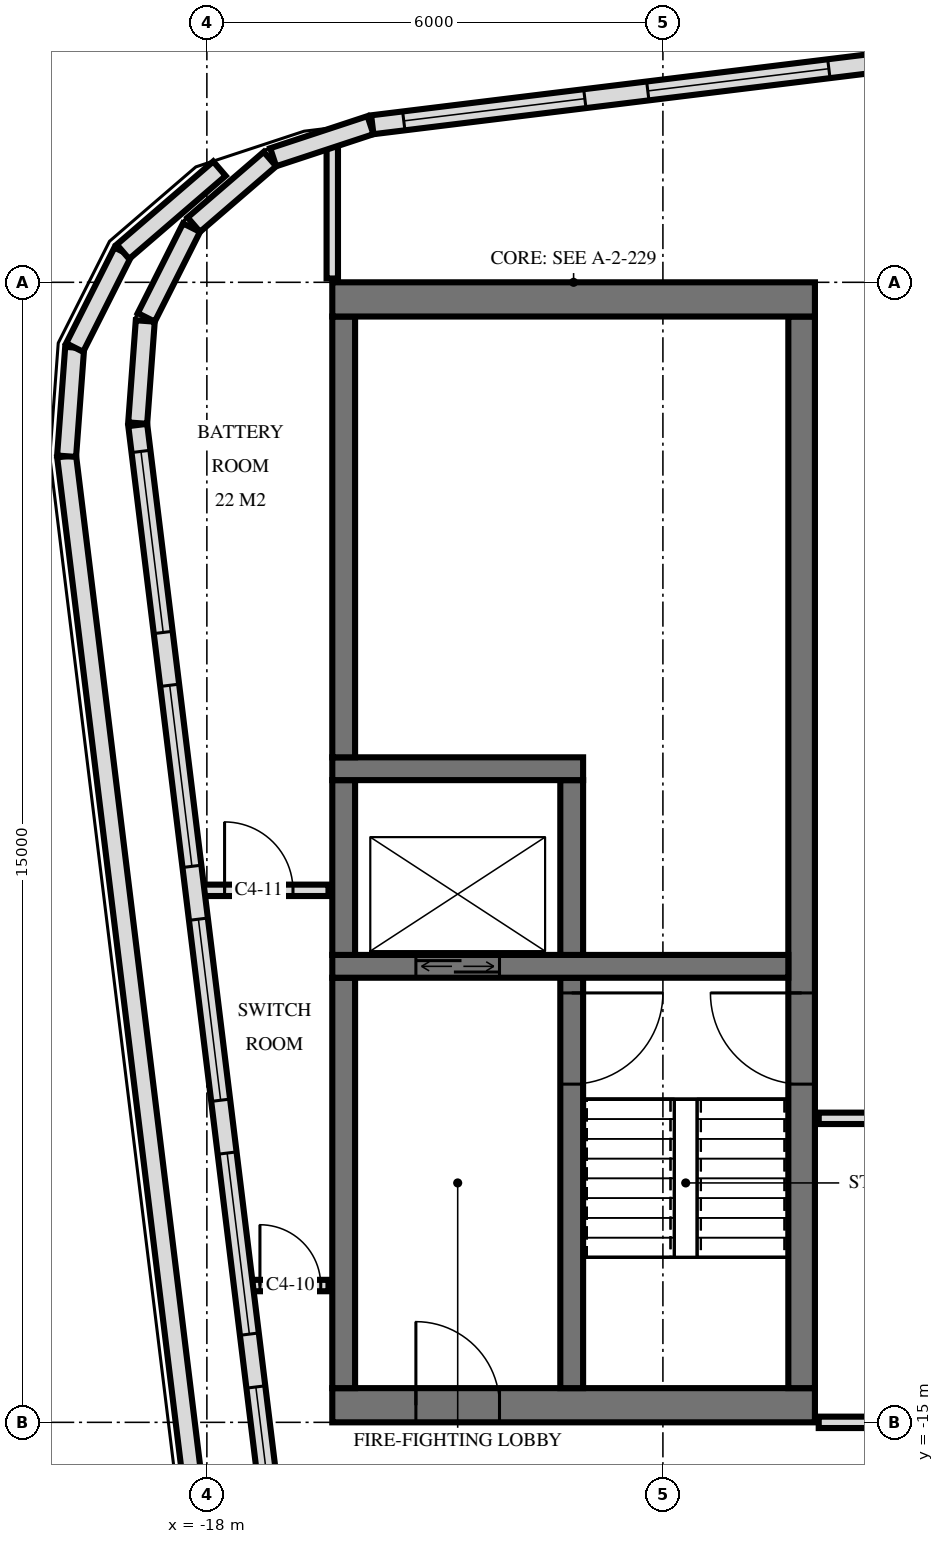
"""IFC4 building model, lengths in metres.
Left out: names, types, materials, properties, quantities, classifications, styles, units other than length and angle.
Written with IfcOpenShell. Run it as: python <this file> out.ifc"""

import sys

from ifc_helpers import new_model, si_unit, direction, frame, frame_2d, origin, place, context, subcontext, project, spatial, rectangle, extrude, element, fill, save


model = new_model("IFC4")
c1 = context("Model", 3, precision=1e-05, world=origin(), true_north=direction((0.0, 1.0)))
c2 = subcontext(c1, "Body", "Model", "MODEL_VIEW")
j1 = project(units=[si_unit("LENGTHUNIT", "METRE"), si_unit("PLANEANGLEUNIT", "RADIAN")], contexts=[c1])
p1 = place(None, origin())
s1 = spatial("IfcSite", under=j1, at=p1, CompositionType="ELEMENT")
p2 = place(p1, origin())
s2 = spatial("IfcBuilding", under=s1, at=p2, CompositionType="ELEMENT")
p3 = place(p2, frame((0.0, 0.0, 357.4)))
s3 = spatial("IfcBuildingStorey", under=s2, at=p3, CompositionType="ELEMENT", Elevation=357.4)
p4 = place(p3, frame((-16.35, -0.225, 0.0), z_axis=(0.0, 0.0, 1.0), x_axis=(1.0, 0.0, 0.0)))
e1 = element("IfcWall", 1, at=p4, inside=s3, PredefinedType="SHEAR", context=c2, shape_type="SweptSolid", body=[
    extrude(rectangle(XDim=6.35, YDim=0.45, at=frame_2d((3.175, 0.0))), origin(), (0.0, 0.0, 1.0), 6.0),
])
p5 = place(p3, frame((-16.35, -14.775, 0.0), z_axis=(0.0, 0.0, 1.0), x_axis=(1.0, 0.0, 0.0)))
e2 = element("IfcWall", 2, at=p5, inside=s3, PredefinedType="SHEAR", context=c2, shape_type="SweptSolid", body=[
    extrude(rectangle(XDim=6.35, YDim=0.45, at=frame_2d((3.175, 0.0))), origin(), (0.0, 0.0, 1.0), 6.0),
])
p6 = place(p5, frame((1.1, 0.0, 0.0)))
e3 = element("IfcOpeningElement", 3, at=p6, cuts=e2, PredefinedType="OPENING", context=c2, shape_type="SweptSolid", body=[
    extrude(rectangle(XDim=1.1, YDim=2.1, at=frame_2d((0.55, 1.05))), frame((0.0, 0.235, 0.0), z_axis=(0.0, -1.0, 0.0), x_axis=(1.0, 0.0, 0.0)), (0.0, 0.0, 1.0), 0.47),
])
p7 = place(p3, frame((-10.175, -14.55, 0.0), z_axis=(0.0, 0.0, 1.0), x_axis=(0.0, 1.0, 0.0)))
e4 = element("IfcWall", 4, at=p7, inside=s3, PredefinedType="SHEAR", context=c2, shape_type="SweptSolid", body=[
    extrude(rectangle(XDim=14.1, YDim=0.35, at=frame_2d((7.05, 0.0))), origin(), (0.0, 0.0, 1.0), 6.0),
])
p8 = place(p7, frame((4.0, 0.0, 0.0)))
e5 = element("IfcOpeningElement", 5, at=p8, cuts=e4, PredefinedType="OPENING", context=c2, shape_type="SweptSolid", body=[
    extrude(rectangle(XDim=1.2, YDim=2.1, at=frame_2d((0.6, 1.05))), frame((0.0, 0.185, 0.0), z_axis=(0.0, -1.0, 0.0), x_axis=(1.0, 0.0, 0.0)), (0.0, 0.0, 1.0), 0.37),
])
p9 = place(p3, frame((-16.2, -6.25, 0.0), z_axis=(0.0, 0.0, 1.0), x_axis=(0.0, 1.0, 0.0)))
e6 = element("IfcWall", 6, at=p9, inside=s3, PredefinedType="SHEAR", context=c2, shape_type="SweptSolid", body=[
    extrude(rectangle(XDim=5.8, YDim=0.3, at=frame_2d((2.9, 0.0))), origin(), (0.0, 0.0, 1.0), 6.0),
])
p10 = place(p3, frame((-16.2, -14.55, 0.0), z_axis=(0.0, 0.0, 1.0), x_axis=(0.0, 1.0, 0.0)))
e7 = element("IfcWall", 7, at=p10, inside=s3, PredefinedType="SHEAR", context=c2, shape_type="SweptSolid", body=[
    extrude(rectangle(XDim=5.4, YDim=0.3, at=frame_2d((2.7, 0.0))), origin(), (0.0, 0.0, 1.0), 6.0),
])
p11 = place(p3, frame((-16.35, -9.0, 0.0), z_axis=(0.0, 0.0, 1.0), x_axis=(1.0, 0.0, 0.0)))
e8 = element("IfcWall", 8, at=p11, inside=s3, PredefinedType="SHEAR", context=c2, shape_type="SweptSolid", body=[
    extrude(rectangle(XDim=6.0, YDim=0.3, at=frame_2d((3.0, 0.0))), origin(), (0.0, 0.0, 1.0), 6.0),
])
p12 = place(p11, frame((1.1, 0.0, 0.0)))
e9 = element("IfcOpeningElement", 9, at=p12, cuts=e8, PredefinedType="OPENING", context=c2, shape_type="SweptSolid", body=[
    extrude(rectangle(XDim=1.1, YDim=2.1, at=frame_2d((0.55, 1.05))), frame((0.0, 0.16, 0.0), z_axis=(0.0, -1.0, 0.0), x_axis=(1.0, 0.0, 0.0)), (0.0, 0.0, 1.0), 0.32),
])
p13 = place(p3, frame((-13.2, -14.55, 0.0), z_axis=(0.0, 0.0, 1.0), x_axis=(0.0, 1.0, 0.0)))
e10 = element("IfcWall", 10, at=p13, inside=s3, PredefinedType="SHEAR", context=c2, shape_type="SweptSolid", body=[
    extrude(rectangle(XDim=5.4, YDim=0.3, at=frame_2d((2.7, 0.0))), origin(), (0.0, 0.0, 1.0), 6.0),
])
p14 = place(p13, frame((4.0, 0.0, 0.0)))
e11 = element("IfcOpeningElement", 11, at=p14, cuts=e10, PredefinedType="OPENING", context=c2, shape_type="SweptSolid", body=[
    extrude(rectangle(XDim=1.2, YDim=2.1, at=frame_2d((0.6, 1.05))), frame((0.0, 0.16, 0.0), z_axis=(0.0, -1.0, 0.0), x_axis=(1.0, 0.0, 0.0)), (0.0, 0.0, 1.0), 0.32),
])
p15 = place(p3, frame((-16.35, -6.4, 0.0), z_axis=(0.0, 0.0, 1.0), x_axis=(1.0, 0.0, 0.0)))
e12 = element("IfcWall", 12, at=p15, inside=s3, PredefinedType="SHEAR", context=c2, shape_type="SweptSolid", body=[
    extrude(rectangle(XDim=3.3, YDim=0.3, at=frame_2d((1.65, 0.0))), origin(), (0.0, 0.0, 1.0), 6.0),
])
for number, where, z_axis, x_axis in (
    (13, (-13.2, -8.85, 0.0), (0.0, 0.0, 1.0), (0.0, 1.0, 0.0)),
    (14, (-16.2, -8.85, 0.0), (0.0, 0.0, 1.0), (0.0, 1.0, 0.0)),
):
    element("IfcWall", number, at=place(p3, frame(where, z_axis=z_axis, x_axis=x_axis)), inside=s3, PredefinedType="SHEAR", context=c2, shape_type="SweptSolid", body=[
        extrude(rectangle(XDim=2.3, YDim=0.3, at=frame_2d((1.15, 0.0))), origin(), (0.0, 0.0, 1.0), 6.0),
    ])
p16 = place(p3, frame((13.07, 5.621, 0.0), z_axis=(0.0, 0.0, 1.0), x_axis=(-0.992546587848, -0.121865790738, 0.0)))
e15 = element("IfcWall", 15, at=p16, inside=s3, PredefinedType="SOLIDWALL", context=c2, shape_type="SweptSolid", body=[
    extrude(rectangle(XDim=29.111, YDim=0.25, at=frame_2d((14.555, 0.0))), origin(), (0.0, 0.0, 1.0), 5.59),
])
p17 = place(p16, frame((0.417, 0.0, 0.838)))
e16 = element("IfcOpeningElement", 16, at=p17, cuts=e15, PredefinedType="OPENING", context=c2, shape_type="SweptSolid", body=[
    extrude(rectangle(XDim=2.4, YDim=3.6, at=frame_2d((1.2, 1.8))), frame((0.0, 0.135, 0.0), z_axis=(0.0, -1.0, 0.0), x_axis=(1.0, 0.0, 0.0)), (0.0, 0.0, 1.0), 0.27),
])
p18 = place(p16, frame((3.652, 0.0, 0.838)))
e17 = element("IfcOpeningElement", 17, at=p18, cuts=e15, PredefinedType="OPENING", context=c2, shape_type="SweptSolid", body=[
    extrude(rectangle(XDim=2.4, YDim=3.6, at=frame_2d((1.2, 1.8))), frame((0.0, 0.135, 0.0), z_axis=(0.0, -1.0, 0.0), x_axis=(1.0, 0.0, 0.0)), (0.0, 0.0, 1.0), 0.27),
])
p19 = place(p16, frame((6.886, 0.0, 0.838)))
e18 = element("IfcOpeningElement", 18, at=p19, cuts=e15, PredefinedType="OPENING", context=c2, shape_type="SweptSolid", body=[
    extrude(rectangle(XDim=2.4, YDim=3.6, at=frame_2d((1.2, 1.8))), frame((0.0, 0.135, 0.0), z_axis=(0.0, -1.0, 0.0), x_axis=(1.0, 0.0, 0.0)), (0.0, 0.0, 1.0), 0.27),
])
p20 = place(p16, frame((10.121, 0.0, 0.838)))
e19 = element("IfcOpeningElement", 19, at=p20, cuts=e15, PredefinedType="OPENING", context=c2, shape_type="SweptSolid", body=[
    extrude(rectangle(XDim=2.4, YDim=3.6, at=frame_2d((1.2, 1.8))), frame((0.0, 0.135, 0.0), z_axis=(0.0, -1.0, 0.0), x_axis=(1.0, 0.0, 0.0)), (0.0, 0.0, 1.0), 0.27),
])
p21 = place(p16, frame((13.355, 0.0, 0.838)))
e20 = element("IfcOpeningElement", 20, at=p21, cuts=e15, PredefinedType="OPENING", context=c2, shape_type="SweptSolid", body=[
    extrude(rectangle(XDim=2.4, YDim=3.6, at=frame_2d((1.2, 1.8))), frame((0.0, 0.135, 0.0), z_axis=(0.0, -1.0, 0.0), x_axis=(1.0, 0.0, 0.0)), (0.0, 0.0, 1.0), 0.27),
])
p22 = place(p16, frame((16.59, 0.0, 0.838)))
e21 = element("IfcOpeningElement", 21, at=p22, cuts=e15, PredefinedType="OPENING", context=c2, shape_type="SweptSolid", body=[
    extrude(rectangle(XDim=2.4, YDim=3.6, at=frame_2d((1.2, 1.8))), frame((0.0, 0.135, 0.0), z_axis=(0.0, -1.0, 0.0), x_axis=(1.0, 0.0, 0.0)), (0.0, 0.0, 1.0), 0.27),
])
p23 = place(p16, frame((19.824, 0.0, 0.838)))
e22 = element("IfcOpeningElement", 22, at=p23, cuts=e15, PredefinedType="OPENING", context=c2, shape_type="SweptSolid", body=[
    extrude(rectangle(XDim=2.4, YDim=3.6, at=frame_2d((1.2, 1.8))), frame((0.0, 0.135, 0.0), z_axis=(0.0, -1.0, 0.0), x_axis=(1.0, 0.0, 0.0)), (0.0, 0.0, 1.0), 0.27),
])
p24 = place(p16, frame((23.059, 0.0, 0.838)))
e23 = element("IfcOpeningElement", 23, at=p24, cuts=e15, PredefinedType="OPENING", context=c2, shape_type="SweptSolid", body=[
    extrude(rectangle(XDim=2.4, YDim=3.6, at=frame_2d((1.2, 1.8))), frame((0.0, 0.135, 0.0), z_axis=(0.0, -1.0, 0.0), x_axis=(1.0, 0.0, 0.0)), (0.0, 0.0, 1.0), 0.27),
])
p25 = place(p16, frame((26.293, 0.0, 0.838)))
e24 = element("IfcOpeningElement", 24, at=p25, cuts=e15, PredefinedType="OPENING", context=c2, shape_type="SweptSolid", body=[
    extrude(rectangle(XDim=2.4, YDim=3.6, at=frame_2d((1.2, 1.8))), frame((0.0, 0.135, 0.0), z_axis=(0.0, -1.0, 0.0), x_axis=(1.0, 0.0, 0.0)), (0.0, 0.0, 1.0), 0.27),
])
p26 = place(p3, frame((-15.847, 2.068, 0.0), z_axis=(0.0, 0.0, 1.0), x_axis=(-0.949692775535, -0.313183064829, 0.0)))
e25 = element("IfcWall", 25, at=p26, inside=s3, PredefinedType="SOLIDWALL", context=c2, shape_type="SweptSolid", body=[
    extrude(rectangle(XDim=1.348, YDim=0.25, at=frame_2d((0.674, 0.0))), origin(), (0.0, 0.0, 1.0), 5.59),
])
p27 = place(p3, frame((-17.17, 1.622, 0.0), z_axis=(0.0, 0.0, 1.0), x_axis=(-0.757573589708, -0.652749765359, 0.0)))
e26 = element("IfcWall", 26, at=p27, inside=s3, PredefinedType="SOLIDWALL", context=c2, shape_type="SweptSolid", body=[
    extrude(rectangle(XDim=1.323, YDim=0.25, at=frame_2d((0.662, 0.0))), origin(), (0.0, 0.0, 1.0), 5.59),
])
p28 = place(p3, frame((-18.202, 0.719, 0.0), z_axis=(0.0, 0.0, 1.0), x_axis=(-0.450017080071, -0.893019948066, 0.0)))
e27 = element("IfcWall", 27, at=p28, inside=s3, PredefinedType="SOLIDWALL", context=c2, shape_type="SweptSolid", body=[
    extrude(rectangle(XDim=1.323, YDim=0.25, at=frame_2d((0.661, 0.0))), origin(), (0.0, 0.0, 1.0), 5.59),
])
p29 = place(p3, frame((-18.81, -0.509, 0.0), z_axis=(0.0, 0.0, 1.0), x_axis=(-0.074258626379, -0.99723901669, 0.0)))
e28 = element("IfcWall", 28, at=p29, inside=s3, PredefinedType="SOLIDWALL", context=c2, shape_type="SweptSolid", body=[
    extrude(rectangle(XDim=1.348, YDim=0.25, at=frame_2d((0.674, 0.0))), origin(), (0.0, 0.0, 1.0), 5.59),
])
p30 = place(p3, frame((-18.91, -1.877, 0.0), z_axis=(0.0, 0.0, 1.0), x_axis=(0.121859728622, -0.992547332141, 0.0)))
e29 = element("IfcWall", 29, at=p30, inside=s3, PredefinedType="SOLIDWALL", context=c2, shape_type="SweptSolid", body=[
    extrude(rectangle(XDim=15.503, YDim=0.25, at=frame_2d((7.751, 0.0))), origin(), (0.0, 0.0, 1.0), 5.59),
])
p31 = place(p30, frame((0.35, 0.0, 0.838)))
e30 = element("IfcOpeningElement", 30, at=p31, cuts=e29, PredefinedType="OPENING", context=c2, shape_type="SweptSolid", body=[
    extrude(rectangle(XDim=2.4, YDim=3.6, at=frame_2d((1.2, 1.8))), frame((0.0, 0.135, 0.0), z_axis=(0.0, -1.0, 0.0), x_axis=(1.0, 0.0, 0.0)), (0.0, 0.0, 1.0), 0.27),
])
p32 = place(p30, frame((3.451, 0.0, 0.838)))
e31 = element("IfcOpeningElement", 31, at=p32, cuts=e29, PredefinedType="OPENING", context=c2, shape_type="SweptSolid", body=[
    extrude(rectangle(XDim=2.4, YDim=3.6, at=frame_2d((1.2, 1.8))), frame((0.0, 0.135, 0.0), z_axis=(0.0, -1.0, 0.0), x_axis=(1.0, 0.0, 0.0)), (0.0, 0.0, 1.0), 0.27),
])
p33 = place(p30, frame((6.552, 0.0, 0.838)))
e32 = element("IfcOpeningElement", 32, at=p33, cuts=e29, PredefinedType="OPENING", context=c2, shape_type="SweptSolid", body=[
    extrude(rectangle(XDim=2.4, YDim=3.6, at=frame_2d((1.2, 1.8))), frame((0.0, 0.135, 0.0), z_axis=(0.0, -1.0, 0.0), x_axis=(1.0, 0.0, 0.0)), (0.0, 0.0, 1.0), 0.27),
])
p34 = place(p30, frame((9.652, 0.0, 0.838)))
e33 = element("IfcOpeningElement", 33, at=p34, cuts=e29, PredefinedType="OPENING", context=c2, shape_type="SweptSolid", body=[
    extrude(rectangle(XDim=2.4, YDim=3.6, at=frame_2d((1.2, 1.8))), frame((0.0, 0.135, 0.0), z_axis=(0.0, -1.0, 0.0), x_axis=(1.0, 0.0, 0.0)), (0.0, 0.0, 1.0), 0.27),
])
p35 = place(p30, frame((12.752, 0.0, 0.838)))
e34 = element("IfcOpeningElement", 34, at=p35, cuts=e29, PredefinedType="OPENING", context=c2, shape_type="SweptSolid", body=[
    extrude(rectangle(XDim=2.4, YDim=3.6, at=frame_2d((1.2, 1.8))), frame((0.0, 0.135, 0.0), z_axis=(0.0, -1.0, 0.0), x_axis=(1.0, 0.0, 0.0)), (0.0, 0.0, 1.0), 0.27),
])
p36 = place(p3, frame((-17.853, -18.516, 0.0), z_axis=(0.0, 0.0, 1.0), x_axis=(-0.12186213875, 0.992547036235, 0.0)))
e35 = element("IfcWall", 35, at=p36, inside=s3, PredefinedType="PARAPET", context=c2, shape_type="SweptSolid", body=[
    extrude(rectangle(XDim=16.35, YDim=0.25, at=frame_2d((8.175, 0.0))), origin(), (0.0, 0.0, 1.0), 1.1),
])
p37 = place(p3, frame((-19.845, -2.288, 0.0), z_axis=(0.0, 0.0, 1.0), x_axis=(0.074066108954, 0.997253333664, 0.0)))
e36 = element("IfcWall", 36, at=p37, inside=s3, PredefinedType="PARAPET", context=c2, shape_type="SweptSolid", body=[
    extrude(rectangle(XDim=1.434, YDim=0.25, at=frame_2d((0.717, 0.0))), origin(), (0.0, 0.0, 1.0), 1.1),
])
p38 = place(p3, frame((-19.739, -0.858, 0.0), z_axis=(0.0, 0.0, 1.0), x_axis=(0.450047928384, 0.893004402093, 0.0)))
e37 = element("IfcWall", 37, at=p38, inside=s3, PredefinedType="PARAPET", context=c2, shape_type="SweptSolid", body=[
    extrude(rectangle(XDim=1.412, YDim=0.25, at=frame_2d((0.706, 0.0))), origin(), (0.0, 0.0, 1.0), 1.1),
])
p39 = place(p3, frame((-19.104, 0.402, 0.0), z_axis=(0.0, 0.0, 1.0), x_axis=(0.757618667938, 0.65269744445, 0.0)))
e38 = element("IfcWall", 38, at=p39, inside=s3, PredefinedType="PARAPET", context=c2, shape_type="SweptSolid", body=[
    extrude(rectangle(XDim=1.675, YDim=0.25, at=frame_2d((0.838, 0.0))), origin(), (0.0, 0.0, 1.0), 1.1),
])
p40 = place(p3, frame((-16.35, 0.05, 0.0), z_axis=(0.0, 0.0, 1.0), x_axis=(0.0, 1.0, 0.0)))
e39 = element("IfcWall", 39, at=p40, inside=s3, PredefinedType="PARTITIONING", context=c2, shape_type="SweptSolid", body=[
    extrude(rectangle(XDim=1.794, YDim=0.15, at=frame_2d((0.897, 0.0))), origin(), (0.0, 0.0, 1.0), 5.72),
])
p41 = place(p3, frame((-9.95, -15.0, 0.0), z_axis=(0.0, 0.0, 1.0), x_axis=(1.0, 0.0, 0.0)))
e40 = element("IfcWall", 40, at=p41, inside=s3, PredefinedType="PARTITIONING", context=c2, shape_type="SweptSolid", body=[
    extrude(rectangle(XDim=19.9, YDim=0.15, at=frame_2d((9.95, 0.0))), origin(), (0.0, 0.0, 1.0), 4.954),
])
p42 = place(p41, frame((9.43, 0.0, 0.0)))
e41 = element("IfcOpeningElement", 41, at=p42, cuts=e40, PredefinedType="OPENING", context=c2, shape_type="SweptSolid", body=[
    extrude(rectangle(XDim=1.0, YDim=2.1, at=frame_2d((0.5, 1.05))), frame((0.0, 0.085, 0.0), z_axis=(0.0, -1.0, 0.0), x_axis=(1.0, 0.0, 0.0)), (0.0, 0.0, 1.0), 0.17),
])
p43 = place(p3, frame((-17.404, -13.2, 0.0), z_axis=(0.0, 0.0, 1.0), x_axis=(1.0, 0.0, 0.0)))
e42 = element("IfcWall", 42, at=p43, inside=s3, PredefinedType="PARTITIONING", context=c2, shape_type="SweptSolid", body=[
    extrude(rectangle(XDim=1.004, YDim=0.15, at=frame_2d((0.502, 0.0))), origin(), (0.0, 0.0, 1.0), 5.72),
])
p44 = place(p43, frame((0.102, 0.0, 0.0)))
e43 = element("IfcOpeningElement", 43, at=p44, cuts=e42, PredefinedType="OPENING", context=c2, shape_type="SweptSolid", body=[
    extrude(rectangle(XDim=0.8, YDim=2.1, at=frame_2d((0.4, 1.05))), frame((0.0, 0.085, 0.0), z_axis=(0.0, -1.0, 0.0), x_axis=(1.0, 0.0, 0.0)), (0.0, 0.0, 1.0), 0.17),
])
p45 = place(p3, frame((-9.95, -11.0, 0.0), z_axis=(0.0, 0.0, 1.0), x_axis=(1.0, 0.0, 0.0)))
e44 = element("IfcWall", 44, at=p45, inside=s3, PredefinedType="PARTITIONING", context=c2, shape_type="SweptSolid", body=[
    extrude(rectangle(XDim=19.9, YDim=0.15, at=frame_2d((9.95, 0.0))), origin(), (0.0, 0.0, 1.0), 5.72),
])
p46 = place(p3, frame((-18.103, -8.0, 0.0), z_axis=(0.0, 0.0, 1.0), x_axis=(1.0, 0.0, 0.0)))
e45 = element("IfcWall", 45, at=p46, inside=s3, PredefinedType="PARTITIONING", context=c2, shape_type="SweptSolid", body=[
    extrude(rectangle(XDim=1.703, YDim=0.15, at=frame_2d((0.851, 0.0))), origin(), (0.0, 0.0, 1.0), 5.72),
])
p47 = place(p46, frame((0.335, 0.0, 0.0)))
e46 = element("IfcOpeningElement", 46, at=p47, cuts=e45, PredefinedType="OPENING", context=c2, shape_type="SweptSolid", body=[
    extrude(rectangle(XDim=0.9, YDim=2.1, at=frame_2d((0.45, 1.05))), frame((0.0, 0.085, 0.0), z_axis=(0.0, -1.0, 0.0), x_axis=(1.0, 0.0, 0.0)), (0.0, 0.0, 1.0), 0.17),
])
p48 = place(p24, origin())
e47 = element("IfcWindow", 47, at=p48, inside=s3, PartitioningType="SINGLE_PANEL", PredefinedType="USERDEFINED", context=c2, shape_type="SweptSolid", body=[
    extrude(rectangle(XDim=2.4, YDim=3.6, at=frame_2d((1.2, 1.8))), frame((0.0, 0.03, 0.0), z_axis=(0.0, -1.0, 0.0), x_axis=(1.0, 0.0, 0.0)), (0.0, 0.0, 1.0), 0.06),
])
fill(e23, e47)
p49 = place(p25, origin())
e48 = element("IfcWindow", 48, at=p49, inside=s3, PartitioningType="SINGLE_PANEL", PredefinedType="USERDEFINED", context=c2, shape_type="SweptSolid", body=[
    extrude(rectangle(XDim=2.4, YDim=3.6, at=frame_2d((1.2, 1.8))), frame((0.0, 0.03, 0.0), z_axis=(0.0, -1.0, 0.0), x_axis=(1.0, 0.0, 0.0)), (0.0, 0.0, 1.0), 0.06),
])
fill(e24, e48)
p50 = place(p31, origin())
e49 = element("IfcWindow", 49, at=p50, inside=s3, PartitioningType="SINGLE_PANEL", PredefinedType="USERDEFINED", context=c2, shape_type="SweptSolid", body=[
    extrude(rectangle(XDim=2.4, YDim=3.6, at=frame_2d((1.2, 1.8))), frame((0.0, 0.03, 0.0), z_axis=(0.0, -1.0, 0.0), x_axis=(1.0, 0.0, 0.0)), (0.0, 0.0, 1.0), 0.06),
])
fill(e30, e49)
p51 = place(p32, origin())
e50 = element("IfcWindow", 50, at=p51, inside=s3, PartitioningType="SINGLE_PANEL", PredefinedType="USERDEFINED", context=c2, shape_type="SweptSolid", body=[
    extrude(rectangle(XDim=2.4, YDim=3.6, at=frame_2d((1.2, 1.8))), frame((0.0, 0.03, 0.0), z_axis=(0.0, -1.0, 0.0), x_axis=(1.0, 0.0, 0.0)), (0.0, 0.0, 1.0), 0.06),
])
fill(e31, e50)
p52 = place(p33, origin())
e51 = element("IfcWindow", 51, at=p52, inside=s3, PartitioningType="SINGLE_PANEL", PredefinedType="USERDEFINED", context=c2, shape_type="SweptSolid", body=[
    extrude(rectangle(XDim=2.4, YDim=3.6, at=frame_2d((1.2, 1.8))), frame((0.0, 0.03, 0.0), z_axis=(0.0, -1.0, 0.0), x_axis=(1.0, 0.0, 0.0)), (0.0, 0.0, 1.0), 0.06),
])
fill(e32, e51)
p53 = place(p34, origin())
e52 = element("IfcWindow", 52, at=p53, inside=s3, PartitioningType="SINGLE_PANEL", PredefinedType="USERDEFINED", context=c2, shape_type="SweptSolid", body=[
    extrude(rectangle(XDim=2.4, YDim=3.6, at=frame_2d((1.2, 1.8))), frame((0.0, 0.03, 0.0), z_axis=(0.0, -1.0, 0.0), x_axis=(1.0, 0.0, 0.0)), (0.0, 0.0, 1.0), 0.06),
])
fill(e33, e52)
p54 = place(p35, origin())
e53 = element("IfcWindow", 53, at=p54, inside=s3, PartitioningType="SINGLE_PANEL", PredefinedType="USERDEFINED", context=c2, shape_type="SweptSolid", body=[
    extrude(rectangle(XDim=2.4, YDim=3.6, at=frame_2d((1.2, 1.8))), frame((0.0, 0.03, 0.0), z_axis=(0.0, -1.0, 0.0), x_axis=(1.0, 0.0, 0.0)), (0.0, 0.0, 1.0), 0.06),
])
fill(e34, e53)
p55 = place(p12, origin())
e54 = element("IfcDoor", 54, at=p55, inside=s3, OperationType="DOUBLE_DOOR_SLIDING", PredefinedType="USERDEFINED", context=c2, shape_type="SweptSolid", body=[
    extrude(rectangle(XDim=1.1, YDim=2.1, at=frame_2d((0.55, 1.05))), frame((0.0, 0.025, 0.0), z_axis=(0.0, -1.0, 0.0), x_axis=(1.0, 0.0, 0.0)), (0.0, 0.0, 1.0), 0.05),
])
fill(e9, e54)
p56 = place(p8, origin())
e55 = element("IfcDoor", 55, at=p56, inside=s3, OperationType="SINGLE_SWING_LEFT", PredefinedType="DOOR", context=c2, shape_type="SweptSolid", body=[
    extrude(rectangle(XDim=1.2, YDim=2.1, at=frame_2d((0.6, 1.05))), frame((0.0, 0.025, 0.0), z_axis=(0.0, -1.0, 0.0), x_axis=(1.0, 0.0, 0.0)), (0.0, 0.0, 1.0), 0.05),
])
fill(e5, e55)
p57 = place(p6, origin())
e56 = element("IfcDoor", 56, at=p57, inside=s3, OperationType="SINGLE_SWING_RIGHT", PredefinedType="DOOR", context=c2, shape_type="SweptSolid", body=[
    extrude(rectangle(XDim=1.1, YDim=2.1, at=frame_2d((0.55, 1.05))), frame((0.0, 0.025, 0.0), z_axis=(0.0, -1.0, 0.0), x_axis=(1.0, 0.0, 0.0)), (0.0, 0.0, 1.0), 0.05),
])
fill(e3, e56)
p58 = place(p14, frame((0.6, 0.0, 0.0), z_axis=(0.0, 0.0, 1.0), x_axis=(-1.0, 0.0, 0.0)))
e57 = element("IfcDoor", 57, at=p58, inside=s3, OperationType="SINGLE_SWING_RIGHT", PredefinedType="DOOR", context=c2, shape_type="SweptSolid", body=[
    extrude(rectangle(XDim=1.2, YDim=2.1, at=frame_2d((0.0, 1.05))), frame((0.0, -0.025, 0.0), z_axis=(0.0, 1.0, 0.0), x_axis=(-1.0, 0.0, 0.0)), (0.0, 0.0, 1.0), 0.05),
])
fill(e11, e57)
p59 = place(p44, origin())
e58 = element("IfcDoor", 58, at=p59, inside=s3, OperationType="SINGLE_SWING_RIGHT", PredefinedType="DOOR", context=c2, shape_type="SweptSolid", body=[
    extrude(rectangle(XDim=0.8, YDim=2.1, at=frame_2d((0.4, 1.05))), frame((0.0, 0.025, 0.0), z_axis=(0.0, -1.0, 0.0), x_axis=(1.0, 0.0, 0.0)), (0.0, 0.0, 1.0), 0.05),
])
fill(e43, e58)
p60 = place(p47, origin())
e59 = element("IfcDoor", 59, at=p60, inside=s3, OperationType="SINGLE_SWING_RIGHT", PredefinedType="DOOR", context=c2, shape_type="SweptSolid", body=[
    extrude(rectangle(XDim=0.9, YDim=2.1, at=frame_2d((0.45, 1.05))), frame((0.0, 0.025, 0.0), z_axis=(0.0, -1.0, 0.0), x_axis=(1.0, 0.0, 0.0)), (0.0, 0.0, 1.0), 0.05),
])
fill(e46, e59)
save(model, sys.argv[1])
